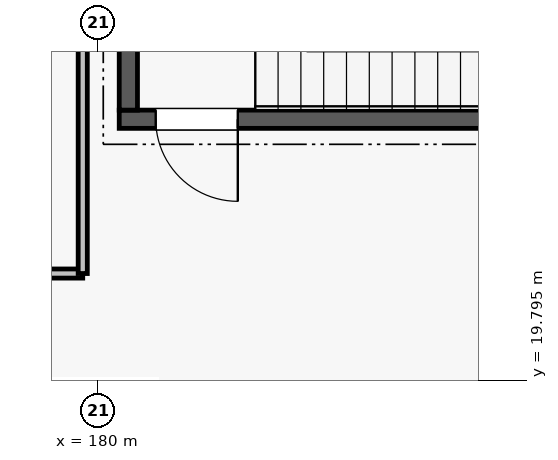
"""IFC4 building model, lengths in metres.
Left out: names, types, materials, properties, quantities, classifications, styles, units other than length and angle.
Written with IfcOpenShell. Run it as: python <this file> out.ifc"""

import sys

from ifc_helpers import new_model, si_unit, direction, frame, frame_2d, origin, place, context, subcontext, project, spatial, rectangle, extrude, element, fill, save


model = new_model("IFC4")
c1 = context("Model", 3, precision=1e-05, world=origin(), true_north=direction((0.0, 1.0)))
c2 = subcontext(c1, "Body", "Model", "MODEL_VIEW")
j1 = project(units=[si_unit("LENGTHUNIT", "METRE"), si_unit("PLANEANGLEUNIT", "RADIAN")], contexts=[c1])
p1 = place(None, origin())
s1 = spatial("IfcSite", under=j1, at=p1, CompositionType="ELEMENT")
p2 = place(p1, origin())
s2 = spatial("IfcBuilding", under=s1, at=p2, CompositionType="ELEMENT")
p3 = place(p2, origin())
s3 = spatial("IfcBuildingStorey", under=s2, at=p3, CompositionType="ELEMENT", Elevation=0.0)
p4 = place(p3, frame((180.28, 23.23, 0.0), z_axis=(0.0, 0.0, 1.0), x_axis=(1.0, 0.0, 0.0)))
e1 = element("IfcWall", 1, at=p4, inside=s3, PredefinedType="SHEAR", context=c2, shape_type="SweptSolid", body=[
    extrude(rectangle(XDim=8.44, YDim=0.24, at=frame_2d((4.22, 0.0))), origin(), (0.0, 0.0, 1.0), 4.55),
])
p5 = place(p4, frame((0.48, 0.0, 0.0)))
e2 = element("IfcOpeningElement", 2, at=p5, cuts=e1, PredefinedType="OPENING", context=c2, shape_type="SweptSolid", body=[
    extrude(rectangle(XDim=1.08, YDim=2.08, at=frame_2d((0.54, 1.04))), frame((0.0, 0.13, 0.0), z_axis=(0.0, -1.0, 0.0), x_axis=(1.0, 0.0, 0.0)), (0.0, 0.0, 1.0), 0.26),
])
p6 = place(p3, frame((180.4, 23.35, 0.0), z_axis=(0.0, 0.0, 1.0), x_axis=(0.0, 1.0, 0.0)))
e3 = element("IfcWall", 3, at=p6, inside=s3, PredefinedType="SHEAR", context=c2, shape_type="SweptSolid", body=[
    extrude(rectangle(XDim=3.25, YDim=0.24, at=frame_2d((1.625, 0.0))), origin(), (0.0, 0.0, 1.0), 4.55),
])
p7 = place(p3, frame((135.4, 21.2, 0.0), z_axis=(0.0, 0.0, 1.0), x_axis=(1.0, 0.0, 0.0)))
e4 = element("IfcWall", 4, at=p7, inside=s3, PredefinedType="PARTITIONING", context=c2, shape_type="SweptSolid", body=[
    extrude(rectangle(XDim=44.4, YDim=0.12, at=frame_2d((22.2, 0.0))), origin(), (0.0, 0.0, 1.0), 3.885),
])
p8 = place(p7, frame((21.29, 0.0, 0.0)))
e5 = element("IfcOpeningElement", 5, at=p8, cuts=e4, PredefinedType="OPENING", context=c2, shape_type="SweptSolid", body=[
    extrude(rectangle(XDim=1.62, YDim=2.14, at=frame_2d((0.81, 1.07))), frame((0.0, 0.07, 0.0), z_axis=(0.0, -1.0, 0.0), x_axis=(1.0, 0.0, 0.0)), (0.0, 0.0, 1.0), 0.14),
])
p9 = place(p3, frame((179.8, 21.2, 0.0), z_axis=(0.0, 0.0, 1.0), x_axis=(0.0, 1.0, 0.0)))
e6 = element("IfcWall", 6, at=p9, inside=s3, PredefinedType="PARTITIONING", context=c2, shape_type="SweptSolid", body=[
    extrude(rectangle(XDim=5.4, YDim=0.12, at=frame_2d((2.7, 0.0))), origin(), (0.0, 0.0, 1.0), 3.885),
])
p10 = place(p5, frame((1.08, 0.0, 0.0), z_axis=(0.0, 0.0, 1.0), x_axis=(-1.0, 0.0, 0.0)))
e7 = element("IfcDoor", 7, at=p10, inside=s3, OperationType="SINGLE_SWING_RIGHT", PredefinedType="DOOR", context=c2, shape_type="SweptSolid", body=[
    extrude(rectangle(XDim=1.08, YDim=2.08, at=frame_2d((0.54, 1.04))), frame((0.0, 0.025, 0.0), z_axis=(0.0, -1.0, 0.0), x_axis=(1.0, 0.0, 0.0)), (0.0, 0.0, 1.0), 0.05),
])
fill(e2, e7)
save(model, sys.argv[1])
